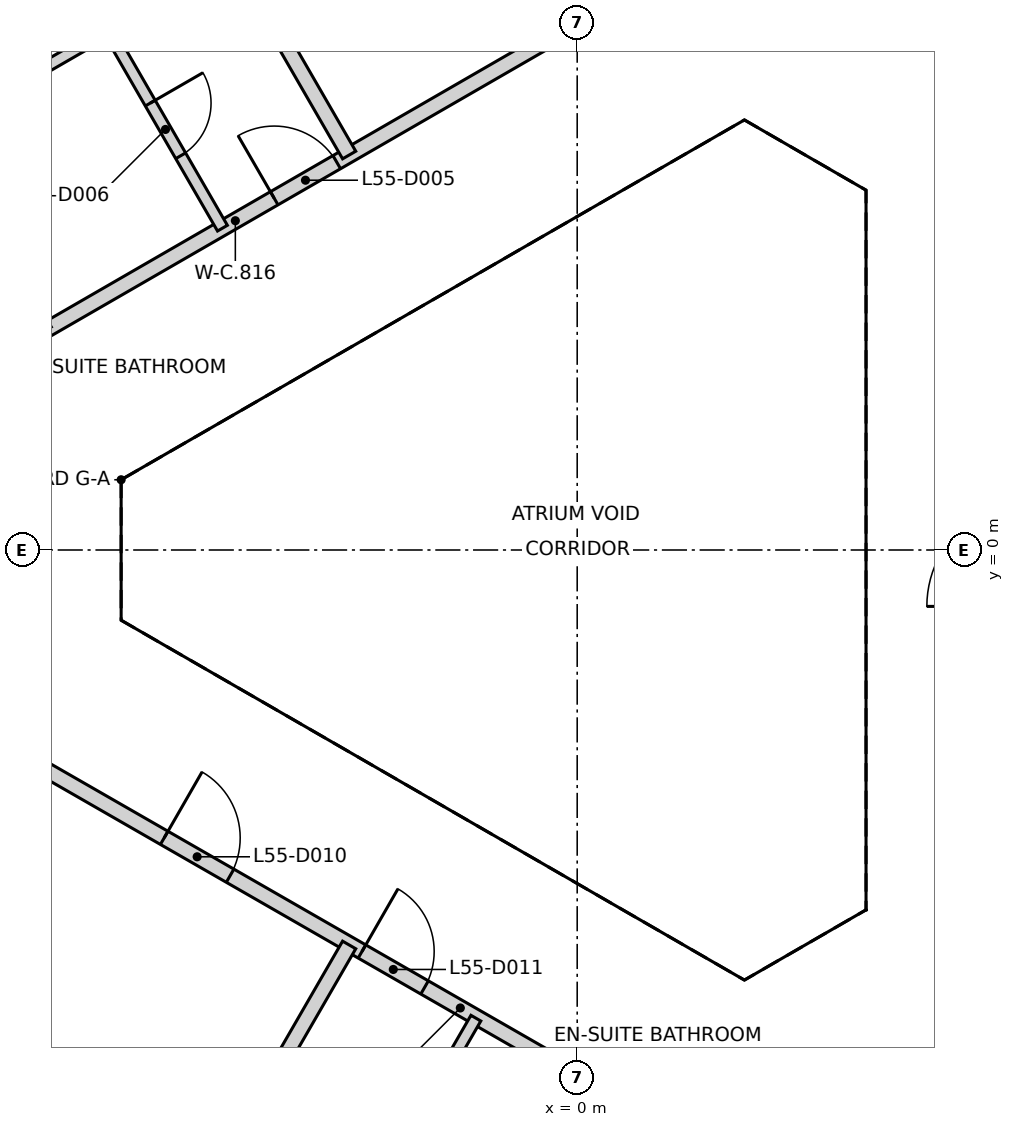
"""IFC4 building model, lengths in metres.
Left out: names, types, materials, properties, quantities, classifications, styles, units other than length and angle.
Written with IfcOpenShell. Run it as: python <this file> out.ifc"""

import sys

from ifc_helpers import new_model, si_unit, direction, frame, frame_2d, origin, place, context, subcontext, project, spatial, rectangle, extrude, element, fill, save


model = new_model("IFC4")
c1 = context("Model", 3, precision=1e-05, world=origin(), true_north=direction((0.0, 1.0)))
c2 = subcontext(c1, "Body", "Model", "MODEL_VIEW")
j1 = project(units=[si_unit("LENGTHUNIT", "METRE"), si_unit("PLANEANGLEUNIT", "RADIAN")], contexts=[c1])
p1 = place(None, origin())
s1 = spatial("IfcSite", under=j1, at=p1, CompositionType="ELEMENT")
p2 = place(p1, origin())
s2 = spatial("IfcBuilding", under=s1, at=p2, CompositionType="ELEMENT")
p3 = place(p2, frame((0.0, 0.0, 221.4)))
s3 = spatial("IfcBuildingStorey", under=s2, at=p3, CompositionType="ELEMENT", Elevation=221.4)
p4 = place(p3, frame((10.42, 6.498, 0.0), z_axis=(0.0, 0.0, 1.0), x_axis=(-0.866021906294, 0.500006057782, 0.0)))
e1 = element("IfcWall", 1, at=p4, inside=s3, PredefinedType="SHEAR", context=c2, shape_type="SweptSolid", body=[
    extrude(rectangle(XDim=11.55, YDim=0.25, at=frame_2d((5.775, 0.0))), origin(), (0.0, 0.0, 1.0), 3.25),
])
p5 = place(p4, frame((10.025, 0.0, 0.0)))
e2 = element("IfcOpeningElement", 2, at=p5, cuts=e1, PredefinedType="OPENING", context=c2, shape_type="SweptSolid", body=[
    extrude(rectangle(XDim=1.2, YDim=2.1, at=frame_2d((0.6, 1.05))), frame((0.0, 0.135, 0.0), z_axis=(0.0, -1.0, 0.0), x_axis=(1.0, 0.0, 0.0)), (0.0, 0.0, 1.0), 0.27),
])
p6 = place(p4, frame((8.725, 0.0, 0.0)))
e3 = element("IfcOpeningElement", 3, at=p6, cuts=e1, PredefinedType="OPENING", context=c2, shape_type="SweptSolid", body=[
    extrude(rectangle(XDim=1.2, YDim=2.1, at=frame_2d((0.6, 1.05))), frame((0.0, 0.135, 0.0), z_axis=(0.0, -1.0, 0.0), x_axis=(1.0, 0.0, 0.0)), (0.0, 0.0, 1.0), 0.27),
])
p7 = place(p3, frame((0.417, -12.273, 0.0), z_axis=(0.0, 0.0, 1.0), x_axis=(0.866021906294, 0.500006057782, 0.0)))
e4 = element("IfcWall", 4, at=p7, inside=s3, PredefinedType="SHEAR", context=c2, shape_type="SweptSolid", body=[
    extrude(rectangle(XDim=11.55, YDim=0.25, at=frame_2d((5.775, 0.0))), origin(), (0.0, 0.0, 1.0), 3.25),
])
p8 = place(p7, frame((10.025, 0.0, 0.0)))
e5 = element("IfcOpeningElement", 5, at=p8, cuts=e4, PredefinedType="OPENING", context=c2, shape_type="SweptSolid", body=[
    extrude(rectangle(XDim=1.2, YDim=2.1, at=frame_2d((0.6, 1.05))), frame((0.0, 0.135, 0.0), z_axis=(0.0, -1.0, 0.0), x_axis=(1.0, 0.0, 0.0)), (0.0, 0.0, 1.0), 0.27),
])
p9 = place(p7, frame((8.725, 0.0, 0.0)))
e6 = element("IfcOpeningElement", 6, at=p9, cuts=e4, PredefinedType="OPENING", context=c2, shape_type="SweptSolid", body=[
    extrude(rectangle(XDim=1.2, YDim=2.1, at=frame_2d((0.6, 1.05))), frame((0.0, 0.135, 0.0), z_axis=(0.0, -1.0, 0.0), x_axis=(1.0, 0.0, 0.0)), (0.0, 0.0, 1.0), 0.27),
])
p10 = place(p3, frame((-10.0, 1.155, 0.0), z_axis=(0.0, 0.0, 1.0), x_axis=(0.866014095592, 0.500019585852, 0.0)))
e7 = element("IfcWall", 7, at=p10, inside=s3, PredefinedType="PARTITIONING", context=c2, shape_type="SweptSolid", body=[
    extrude(rectangle(XDim=12.708, YDim=0.2, at=frame_2d((6.354, 0.0))), origin(), (0.0, 0.0, 1.0), 3.25),
])
p11 = place(p10, frame((6.944, 0.0, 0.0)))
e8 = element("IfcOpeningElement", 8, at=p11, cuts=e7, PredefinedType="OPENING", context=c2, shape_type="SweptSolid", body=[
    extrude(rectangle(XDim=0.95, YDim=2.1, at=frame_2d((0.475, 1.05))), frame((0.0, 0.11, 0.0), z_axis=(0.0, -1.0, 0.0), x_axis=(1.0, 0.0, 0.0)), (0.0, 0.0, 1.0), 0.22),
])
p12 = place(p10, frame((0.2, 0.0, 0.0)))
e9 = element("IfcOpeningElement", 9, at=p12, cuts=e7, PredefinedType="OPENING", context=c2, shape_type="SweptSolid", body=[
    extrude(rectangle(XDim=0.95, YDim=2.1, at=frame_2d((0.475, 1.05))), frame((0.0, 0.11, 0.0), z_axis=(0.0, -1.0, 0.0), x_axis=(1.0, 0.0, 0.0)), (0.0, 0.0, 1.0), 0.22),
])
p13 = place(p3, frame((-7.089, -2.836, 0.0), z_axis=(0.0, 0.0, 1.0), x_axis=(0.867106243364, -0.498123240493, 0.0)))
e10 = element("IfcWall", 10, at=p13, inside=s3, PredefinedType="PARTITIONING", context=c2, shape_type="SweptSolid", body=[
    extrude(rectangle(XDim=12.804, YDim=0.2, at=frame_2d((6.402, 0.0))), origin(), (0.0, 0.0, 1.0), 3.25),
])
p14 = place(p13, frame((1.909, 0.0, 0.0)))
e11 = element("IfcOpeningElement", 11, at=p14, cuts=e10, PredefinedType="OPENING", context=c2, shape_type="SweptSolid", body=[
    extrude(rectangle(XDim=1.0, YDim=2.1, at=frame_2d((0.5, 1.05))), frame((0.0, 0.11, 0.0), z_axis=(0.0, -1.0, 0.0), x_axis=(1.0, 0.0, 0.0)), (0.0, 0.0, 1.0), 0.22),
])
p15 = place(p13, frame((4.91, 0.0, 0.0)))
e12 = element("IfcOpeningElement", 12, at=p15, cuts=e10, PredefinedType="OPENING", context=c2, shape_type="SweptSolid", body=[
    extrude(rectangle(XDim=0.95, YDim=2.1, at=frame_2d((0.475, 1.05))), frame((0.0, 0.11, 0.0), z_axis=(0.0, -1.0, 0.0), x_axis=(1.0, 0.0, 0.0)), (0.0, 0.0, 1.0), 0.22),
])
p16 = place(p13, frame((11.654, 0.0, 0.0)))
e13 = element("IfcOpeningElement", 13, at=p16, cuts=e10, PredefinedType="OPENING", context=c2, shape_type="SweptSolid", body=[
    extrude(rectangle(XDim=0.95, YDim=2.1, at=frame_2d((0.475, 1.05))), frame((0.0, 0.11, 0.0), z_axis=(0.0, -1.0, 0.0), x_axis=(1.0, 0.0, 0.0)), (0.0, 0.0, 1.0), 0.22),
])
for number, where, z_axis, x_axis in (
    (14, (-9.119, 15.795, 0.0), (0.0, 0.0, 1.0), (0.5, -0.866, 0.0)),
    (15, (-9.119, -15.795, 0.0), (0.0, 0.0, 1.0), (0.5, 0.866, 0.0)),
):
    element("IfcWall", number, at=place(p3, frame(where, z_axis=z_axis, x_axis=x_axis)), inside=s3, PredefinedType="PARTITIONING", context=c2, shape_type="SweptSolid", body=[
        extrude(rectangle(XDim=12.238, YDim=0.2, at=frame_2d((6.119, 0.0))), origin(), (0.0, 0.0, 1.0), 3.25),
    ])
p17 = place(p3, frame((-10.114, 4.553, 0.0), z_axis=(0.0, 0.0, 1.0), x_axis=(0.866002713795, 0.500039298155, 0.0)))
e16 = element("IfcWall", 16, at=p17, inside=s3, PredefinedType="PARTITIONING", context=c2, shape_type="SweptSolid", body=[
    extrude(rectangle(XDim=4.558, YDim=0.15, at=frame_2d((2.279, 0.0))), origin(), (0.0, 0.0, 1.0), 3.25),
])
p18 = place(p3, frame((-6.167, 6.832, 0.0), z_axis=(0.0, 0.0, 1.0), x_axis=(0.499990139034, -0.866031096941, 0.0)))
e17 = element("IfcWall", 17, at=p18, inside=s3, PredefinedType="PARTITIONING", context=c2, shape_type="SweptSolid", body=[
    extrude(rectangle(XDim=3.0, YDim=0.15, at=frame_2d((1.5, 0.0))), origin(), (0.0, 0.0, 1.0), 3.25),
])
p19 = place(p18, frame((1.1, 0.0, 0.0)))
e18 = element("IfcOpeningElement", 18, at=p19, cuts=e17, PredefinedType="OPENING", context=c2, shape_type="SweptSolid", body=[
    extrude(rectangle(XDim=0.8, YDim=2.1, at=frame_2d((0.4, 1.05))), frame((0.0, 0.085, 0.0), z_axis=(0.0, -1.0, 0.0), x_axis=(1.0, 0.0, 0.0)), (0.0, 0.0, 1.0), 0.17),
])
p20 = place(p3, frame((-2.833, -8.757, 0.0), z_axis=(0.0, 0.0, 1.0), x_axis=(0.499990139034, 0.866031096941, 0.0)))
e19 = element("IfcWall", 19, at=p20, inside=s3, PredefinedType="PARTITIONING", context=c2, shape_type="SweptSolid", body=[
    extrude(rectangle(XDim=3.0, YDim=0.15, at=frame_2d((1.5, 0.0))), origin(), (0.0, 0.0, 1.0), 3.25),
])
p21 = place(p20, frame((1.1, 0.0, 0.0)))
e20 = element("IfcOpeningElement", 20, at=p21, cuts=e19, PredefinedType="OPENING", context=c2, shape_type="SweptSolid", body=[
    extrude(rectangle(XDim=0.8, YDim=2.1, at=frame_2d((0.4, 1.05))), frame((0.0, 0.085, 0.0), z_axis=(0.0, -1.0, 0.0), x_axis=(1.0, 0.0, 0.0)), (0.0, 0.0, 1.0), 0.17),
])
p22 = place(p11, origin())
e21 = element("IfcDoor", 21, at=p22, inside=s3, OperationType="SINGLE_SWING_LEFT", PredefinedType="DOOR", context=c2, shape_type="SweptSolid", body=[
    extrude(rectangle(XDim=0.95, YDim=2.1, at=frame_2d((0.475, 1.05))), frame((0.0, 0.025, 0.0), z_axis=(0.0, -1.0, 0.0), x_axis=(1.0, 0.0, 0.0)), (0.0, 0.0, 1.0), 0.05),
])
fill(e8, e21)
p23 = place(p19, frame((0.8, 0.0, 0.0), z_axis=(0.0, 0.0, 1.0), x_axis=(-1.0, 0.0, 0.0)))
e22 = element("IfcDoor", 22, at=p23, inside=s3, OperationType="SINGLE_SWING_LEFT", PredefinedType="DOOR", context=c2, shape_type="SweptSolid", body=[
    extrude(rectangle(XDim=0.8, YDim=2.1, at=frame_2d((0.4, 1.05))), frame((0.0, 0.025, 0.0), z_axis=(0.0, -1.0, 0.0), x_axis=(1.0, 0.0, 0.0)), (0.0, 0.0, 1.0), 0.05),
])
fill(e18, e22)
p24 = place(p14, frame((1.0, 0.0, 0.0), z_axis=(0.0, 0.0, 1.0), x_axis=(-1.0, 0.0, 0.0)))
e23 = element("IfcDoor", 23, at=p24, inside=s3, OperationType="SINGLE_SWING_LEFT", PredefinedType="DOOR", context=c2, shape_type="SweptSolid", body=[
    extrude(rectangle(XDim=1.0, YDim=2.1, at=frame_2d((0.5, 1.05))), frame((0.0, 0.025, 0.0), z_axis=(0.0, -1.0, 0.0), x_axis=(1.0, 0.0, 0.0)), (0.0, 0.0, 1.0), 0.05),
])
fill(e11, e23)
p25 = place(p15, frame((0.95, 0.0, 0.0), z_axis=(0.0, 0.0, 1.0), x_axis=(-1.0, 0.0, 0.0)))
e24 = element("IfcDoor", 24, at=p25, inside=s3, OperationType="SINGLE_SWING_LEFT", PredefinedType="DOOR", context=c2, shape_type="SweptSolid", body=[
    extrude(rectangle(XDim=0.95, YDim=2.1, at=frame_2d((0.475, 1.05))), frame((0.0, 0.025, 0.0), z_axis=(0.0, -1.0, 0.0), x_axis=(1.0, 0.0, 0.0)), (0.0, 0.0, 1.0), 0.05),
])
fill(e12, e24)
save(model, sys.argv[1])
